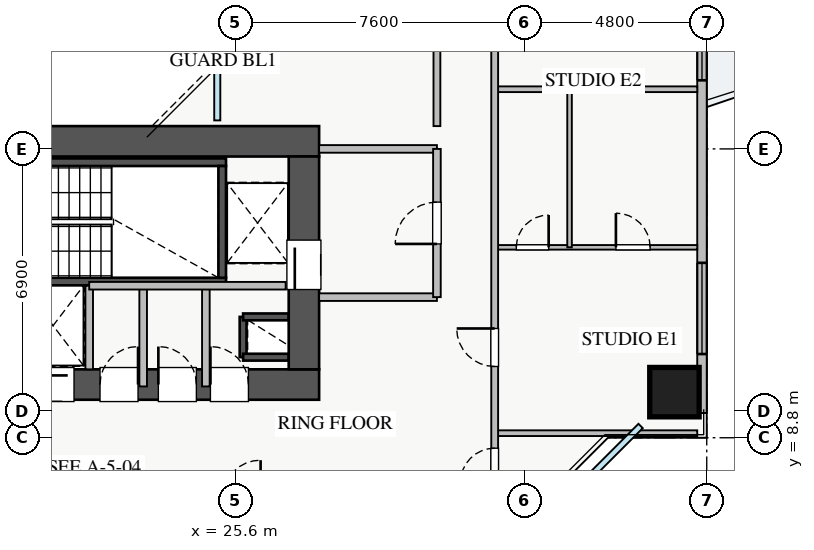
"""IFC4 building model, lengths in metres.
Left out: names, types, materials, properties, quantities, classifications, styles, units other than length and angle.
Written with IfcOpenShell. Run it as: python <this file> out.ifc"""

import sys

from ifc_helpers import new_model, si_unit, direction, frame, frame_2d, origin, origin_2d, place, context, subcontext, project, spatial, rectangle, extrude, source, transform, mapped, element, fill, save


model = new_model("IFC4")
c1 = context("Model", 3, precision=1e-05, world=origin(), true_north=direction((0.0, 1.0)))
c2 = subcontext(c1, "Body", "Model", "MODEL_VIEW")
j1 = project(units=[si_unit("LENGTHUNIT", "METRE"), si_unit("PLANEANGLEUNIT", "RADIAN")], contexts=[c1])
p1 = place(None, origin())
s1 = spatial("IfcSite", under=j1, at=p1, CompositionType="ELEMENT")
p2 = place(p1, origin())
s2 = spatial("IfcBuilding", under=s1, at=p2, CompositionType="ELEMENT")
p3 = place(p2, frame((0.0, 0.0, 32.75)))
s3 = spatial("IfcBuildingStorey", under=s2, at=p3, CompositionType="ELEMENT", Elevation=32.75)
p4 = place(p3, frame((25.8, 10.92, 0.0), z_axis=(0.0, 0.0, 1.0), x_axis=(0.0, 1.0, 0.0)))
e1 = element("IfcWall", 1, at=p4, inside=s3, PredefinedType="SHEAR", context=c2, shape_type="SweptSolid", body=[
    extrude(rectangle(XDim=1.06, YDim=0.18, at=frame_2d((0.53, 0.0))), origin(), (0.0, 0.0, 1.0), 3.07),
])
for number, where, z_axis, x_axis in (
    (2, (25.8, 11.98, 0.0), (0.0, 0.0, 1.0), (1.0, 0.0, 0.0)),
    (3, (25.8, 10.92, 0.0), (0.0, 0.0, 1.0), (1.0, 0.0, 0.0)),
):
    element("IfcWall", number, at=place(p3, frame(where, z_axis=z_axis, x_axis=x_axis)), inside=s3, PredefinedType="SHEAR", context=c2, shape_type="SweptSolid", body=[
        extrude(rectangle(XDim=1.2, YDim=0.18, at=frame_2d((0.6, 0.0))), origin(), (0.0, 0.0, 1.0), 3.07),
    ])
p5 = place(p3, frame((19.88, 12.8, 0.0), z_axis=(0.0, 0.0, 1.0), x_axis=(1.0, 0.0, 0.0)))
e4 = element("IfcWall", 4, at=p5, inside=s3, PredefinedType="SHEAR", context=c2, shape_type="SweptSolid", body=[
    extrude(rectangle(XDim=1.87, YDim=0.18, at=frame_2d((0.935, 0.0))), origin(), (0.0, 0.0, 1.0), 3.07),
])
p6 = place(p3, frame((18.2, 12.91, 0.0), z_axis=(0.0, 0.0, 1.0), x_axis=(1.0, 0.0, 0.0)))
e5 = element("IfcWall", 5, at=p6, inside=s3, PredefinedType="SHEAR", context=c2, shape_type="SweptSolid", body=[
    extrude(rectangle(XDim=7.15, YDim=0.2, at=frame_2d((3.575, 0.0))), origin(), (0.0, 0.0, 1.0), 3.25),
])
p7 = place(p6, frame((0.35, 0.0, 0.0)))
e6 = element("IfcOpeningElement", 6, at=p7, cuts=e5, PredefinedType="OPENING", context=c2, shape_type="SweptSolid", body=[
    extrude(rectangle(XDim=1.1, YDim=2.05, at=frame_2d((0.55, 1.025))), frame((0.0, 0.11, 0.0), z_axis=(0.0, -1.0, 0.0), x_axis=(1.0, 0.0, 0.0)), (0.0, 0.0, 1.0), 0.22),
])
p8 = place(p3, frame((18.2, 16.05, 0.0), z_axis=(0.0, 0.0, 1.0), x_axis=(1.0, 0.0, 0.0)))
e7 = element("IfcWall", 7, at=p8, inside=s3, PredefinedType="SHEAR", context=c2, shape_type="SweptSolid", body=[
    extrude(rectangle(XDim=7.15, YDim=0.2, at=frame_2d((3.575, 0.0))), origin(), (0.0, 0.0, 1.0), 3.25),
])
p9 = place(p3, frame((25.25, 13.01, 0.0), z_axis=(0.0, 0.0, 1.0), x_axis=(0.0, 1.0, 0.0)))
e8 = element("IfcWall", 8, at=p9, inside=s3, PredefinedType="SHEAR", context=c2, shape_type="SweptSolid", body=[
    extrude(rectangle(XDim=2.94, YDim=0.2, at=frame_2d((1.47, 0.0))), origin(), (0.0, 0.0, 1.0), 3.25),
])
p10 = place(p3, frame((10.2, 10.2, 0.0), z_axis=(0.0, 0.0, 1.0), x_axis=(1.0, 0.0, 0.0)))
e9 = element("IfcWall", 9, at=p10, inside=s3, PredefinedType="SHEAR", context=c2, shape_type="SweptSolid", body=[
    extrude(rectangle(XDim=17.6, YDim=0.8, at=frame_2d((8.8, 0.0))), origin(), (0.0, 0.0, 1.0), 3.25),
])
p11 = place(p10, frame((1.15, 0.0, 0.0)))
e10 = element("IfcOpeningElement", 10, at=p11, cuts=e9, PredefinedType="OPENING", context=c2, shape_type="SweptSolid", body=[
    extrude(rectangle(XDim=1.1, YDim=2.05, at=frame_2d((0.55, 1.025))), frame((0.0, 0.41, 0.0), z_axis=(0.0, -1.0, 0.0), x_axis=(1.0, 0.0, 0.0)), (0.0, 0.0, 1.0), 0.82),
])
p12 = place(p10, frame((8.3, 0.0, 0.0)))
e11 = element("IfcOpeningElement", 11, at=p12, cuts=e9, PredefinedType="OPENING", context=c2, shape_type="SweptSolid", body=[
    extrude(rectangle(XDim=1.1, YDim=2.05, at=frame_2d((0.55, 1.025))), frame((0.0, 0.41, 0.0), z_axis=(0.0, -1.0, 0.0), x_axis=(1.0, 0.0, 0.0)), (0.0, 0.0, 1.0), 0.82),
])
p13 = place(p10, frame((10.05, 0.0, 0.0)))
e12 = element("IfcOpeningElement", 12, at=p13, cuts=e9, PredefinedType="OPENING", context=c2, shape_type="SweptSolid", body=[
    extrude(rectangle(XDim=1.1, YDim=2.05, at=frame_2d((0.55, 1.025))), frame((0.0, 0.41, 0.0), z_axis=(0.0, -1.0, 0.0), x_axis=(1.0, 0.0, 0.0)), (0.0, 0.0, 1.0), 0.82),
])
p14 = place(p10, frame((14.74, 0.0, 0.0)))
e13 = element("IfcOpeningElement", 13, at=p14, cuts=e9, PredefinedType="OPENING", context=c2, shape_type="SweptSolid", body=[
    extrude(rectangle(XDim=1.0, YDim=2.05, at=frame_2d((0.5, 1.025))), frame((0.0, 0.41, 0.0), z_axis=(0.0, -1.0, 0.0), x_axis=(1.0, 0.0, 0.0)), (0.0, 0.0, 1.0), 0.82),
])
p15 = place(p10, frame((11.835, 0.0, 0.0)))
e14 = element("IfcOpeningElement", 14, at=p15, cuts=e9, PredefinedType="OPENING", context=c2, shape_type="SweptSolid", body=[
    extrude(rectangle(XDim=1.0, YDim=2.05, at=frame_2d((0.5, 1.025))), frame((0.0, 0.41, 0.0), z_axis=(0.0, -1.0, 0.0), x_axis=(1.0, 0.0, 0.0)), (0.0, 0.0, 1.0), 0.82),
])
p16 = place(p10, frame((13.37, 0.0, 0.0)))
e15 = element("IfcOpeningElement", 15, at=p16, cuts=e9, PredefinedType="OPENING", context=c2, shape_type="SweptSolid", body=[
    extrude(rectangle(XDim=1.0, YDim=2.05, at=frame_2d((0.5, 1.025))), frame((0.0, 0.41, 0.0), z_axis=(0.0, -1.0, 0.0), x_axis=(1.0, 0.0, 0.0)), (0.0, 0.0, 1.0), 0.82),
])
p17 = place(p3, frame((10.2, 16.6, 0.0), z_axis=(0.0, 0.0, 1.0), x_axis=(1.0, 0.0, 0.0)))
e16 = element("IfcWall", 16, at=p17, inside=s3, PredefinedType="SHEAR", context=c2, shape_type="SweptSolid", body=[
    extrude(rectangle(XDim=17.6, YDim=0.8, at=frame_2d((8.8, 0.0))), origin(), (0.0, 0.0, 1.0), 3.25),
])
p18 = place(p3, frame((27.4, 10.6, 0.0), z_axis=(0.0, 0.0, 1.0), x_axis=(0.0, 1.0, 0.0)))
e17 = element("IfcWall", 17, at=p18, inside=s3, PredefinedType="SHEAR", context=c2, shape_type="SweptSolid", body=[
    extrude(rectangle(XDim=5.6, YDim=0.8, at=frame_2d((2.8, 0.0))), origin(), (0.0, 0.0, 1.0), 3.25),
])
p19 = place(p18, frame((2.1, 0.0, 0.0)))
e18 = element("IfcOpeningElement", 18, at=p19, cuts=e17, PredefinedType="OPENING", context=c2, shape_type="SweptSolid", body=[
    extrude(rectangle(XDim=1.3, YDim=2.05, at=frame_2d((0.65, 1.025))), frame((0.0, 0.41, 0.0), z_axis=(0.0, -1.0, 0.0), x_axis=(1.0, 0.0, 0.0)), (0.0, 0.0, 1.0), 0.82),
])
m1 = source(origin(), c2, "Body", "SweptSolid", [
    extrude(rectangle(XDim=1.3, YDim=1.3, at=origin_2d()), origin(), (0.0, 0.0, 1.0), 3.25),
])
p20 = place(p3, frame((37.15, 10.0, 0.0), z_axis=(0.0, 0.0, 1.0), x_axis=(1.0, 0.0, 0.0)))
e19 = element("IfcColumn", 19, at=p20, inside=s3, PredefinedType="COLUMN", context=c2, shape_type="MappedRepresentation", body=[
    mapped(m1, transform((0.0, 0.0, 0.0), x_axis=(1.0, 0.0, 0.0), y_axis=(0.0, 1.0, 0.0), z_axis=(0.0, 0.0, 1.0), scale=1.0)),
])
p21 = place(p3, frame((37.875, 9.45, 0.0), z_axis=(0.0, 0.0, 1.0), x_axis=(0.0, 1.0, 0.0)))
e20 = element("IfcWall", 20, at=p21, inside=s3, PredefinedType="STANDARD", context=c2, shape_type="SweptSolid", body=[
    extrude(rectangle(XDim=27.1, YDim=0.25, at=frame_2d((13.55, 0.0))), origin(), (0.0, 0.0, 1.0), 2.61),
])
p22 = place(p21, frame((14.4, 0.0, 0.0)))
e21 = element("IfcOpeningElement", 21, at=p22, cuts=e20, PredefinedType="OPENING", context=c2, shape_type="SweptSolid", body=[
    extrude(rectangle(XDim=1.2, YDim=2.1, at=frame_2d((0.6, 1.05))), frame((0.0, 0.135, 0.0), z_axis=(0.0, -1.0, 0.0), x_axis=(1.0, 0.0, 0.0)), (0.0, 0.0, 1.0), 0.27),
])
p23 = place(p21, frame((1.552, 0.0, 0.9)))
e22 = element("IfcOpeningElement", 22, at=p23, cuts=e20, PredefinedType="OPENING", context=c2, shape_type="SweptSolid", body=[
    extrude(rectangle(XDim=2.4, YDim=1.5, at=frame_2d((1.2, 0.75))), frame((0.0, 0.135, 0.0), z_axis=(0.0, -1.0, 0.0), x_axis=(1.0, 0.0, 0.0)), (0.0, 0.0, 1.0), 0.27),
])
p24 = place(p21, frame((23.788, 0.0, 0.9)))
e23 = element("IfcOpeningElement", 23, at=p24, cuts=e20, PredefinedType="OPENING", context=c2, shape_type="SweptSolid", body=[
    extrude(rectangle(XDim=1.8, YDim=1.5, at=frame_2d((0.9, 0.75))), frame((0.0, 0.135, 0.0), z_axis=(0.0, -1.0, 0.0), x_axis=(1.0, 0.0, 0.0)), (0.0, 0.0, 1.0), 0.27),
])
p25 = place(p21, frame((19.758, 0.0, 0.9)))
e24 = element("IfcOpeningElement", 24, at=p25, cuts=e20, PredefinedType="OPENING", context=c2, shape_type="SweptSolid", body=[
    extrude(rectangle(XDim=2.4, YDim=1.5, at=frame_2d((1.2, 0.75))), frame((0.0, 0.135, 0.0), z_axis=(0.0, -1.0, 0.0), x_axis=(1.0, 0.0, 0.0)), (0.0, 0.0, 1.0), 0.27),
])
p26 = place(p21, frame((8.755, 0.0, 0.9)))
e25 = element("IfcOpeningElement", 25, at=p26, cuts=e20, PredefinedType="OPENING", context=c2, shape_type="SweptSolid", body=[
    extrude(rectangle(XDim=0.9, YDim=1.2, at=frame_2d((0.45, 0.6))), frame((0.0, 0.135, 0.0), z_axis=(0.0, -1.0, 0.0), x_axis=(1.0, 0.0, 0.0)), (0.0, 0.0, 1.0), 0.27),
])
for number, where, z_axis, x_axis in (
    (26, (27.8, 16.4, 0.0), (0.0, 0.0, 1.0), (1.0, 0.0, 0.0)),
    (27, (27.8, 12.5, 0.0), (0.0, 0.0, 1.0), (1.0, 0.0, 0.0)),
):
    element("IfcWall", number, at=place(p3, frame(where, z_axis=z_axis, x_axis=x_axis)), inside=s3, PredefinedType="PARTITIONING", context=c2, shape_type="SweptSolid", body=[
        extrude(rectangle(XDim=3.1, YDim=0.2, at=frame_2d((1.55, 0.0))), origin(), (0.0, 0.0, 1.0), 3.07),
    ])
p27 = place(p3, frame((30.9, 12.5, 0.0), z_axis=(0.0, 0.0, 1.0), x_axis=(0.0, 1.0, 0.0)))
e28 = element("IfcWall", 28, at=p27, inside=s3, PredefinedType="PARTITIONING", context=c2, shape_type="SweptSolid", body=[
    extrude(rectangle(XDim=3.9, YDim=0.2, at=frame_2d((1.95, 0.0))), origin(), (0.0, 0.0, 1.0), 3.07),
])
p28 = place(p27, frame((1.4, 0.0, 0.0)))
e29 = element("IfcOpeningElement", 29, at=p28, cuts=e28, PredefinedType="OPENING", context=c2, shape_type="SweptSolid", body=[
    extrude(rectangle(XDim=1.1, YDim=2.05, at=frame_2d((0.55, 1.025))), frame((0.0, 0.11, 0.0), z_axis=(0.0, -1.0, 0.0), x_axis=(1.0, 0.0, 0.0)), (0.0, 0.0, 1.0), 0.22),
])
p29 = place(p3, frame((24.82, 10.15, 0.0), z_axis=(0.0, 0.0, 1.0), x_axis=(0.0, 1.0, 0.0)))
e30 = element("IfcWall", 30, at=p29, inside=s3, PredefinedType="PARTITIONING", context=c2, shape_type="SweptSolid", body=[
    extrude(rectangle(XDim=2.65, YDim=0.2, at=frame_2d((1.325, 0.0))), origin(), (0.0, 0.0, 1.0), 3.07),
])
p30 = place(p3, frame((21.75, 10.6, 0.0), z_axis=(0.0, 0.0, 1.0), x_axis=(0.0, 1.0, 0.0)))
e31 = element("IfcWall", 31, at=p30, inside=s3, PredefinedType="PARTITIONING", context=c2, shape_type="SweptSolid", body=[
    extrude(rectangle(XDim=2.2, YDim=0.2, at=frame_2d((1.1, 0.0))), origin(), (0.0, 0.0, 1.0), 3.07),
])
p31 = place(p3, frame((23.17, 10.15, 0.0), z_axis=(0.0, 0.0, 1.0), x_axis=(0.0, 1.0, 0.0)))
e32 = element("IfcWall", 32, at=p31, inside=s3, PredefinedType="PARTITIONING", context=c2, shape_type="SweptSolid", body=[
    extrude(rectangle(XDim=2.65, YDim=0.2, at=frame_2d((1.325, 0.0))), origin(), (0.0, 0.0, 1.0), 3.07),
])
p32 = place(p3, frame((21.75, 12.8, 0.0), z_axis=(0.0, 0.0, 1.0), x_axis=(1.0, 0.0, 0.0)))
e33 = element("IfcWall", 33, at=p32, inside=s3, PredefinedType="PARTITIONING", context=c2, shape_type="SweptSolid", body=[
    extrude(rectangle(XDim=5.17, YDim=0.2, at=frame_2d((2.585, 0.0))), origin(), (0.0, 0.0, 1.0), 3.07),
])
p33 = place(p3, frame((32.42, 8.92, 0.0), z_axis=(0.0, 0.0, 1.0), x_axis=(1.0, 0.0, 0.0)))
e34 = element("IfcWall", 34, at=p33, inside=s3, PredefinedType="PARTITIONING", context=c2, shape_type="SweptSolid", body=[
    extrude(rectangle(XDim=5.33, YDim=0.15, at=frame_2d((2.665, 0.0))), origin(), (0.0, 0.0, 1.0), 3.07),
])
p34 = place(p3, frame((32.42, 13.81, 0.0), z_axis=(0.0, 0.0, 1.0), x_axis=(1.0, 0.0, 0.0)))
e35 = element("IfcWall", 35, at=p34, inside=s3, PredefinedType="PLUMBINGWALL", context=c2, shape_type="SweptSolid", body=[
    extrude(rectangle(XDim=5.33, YDim=0.12, at=frame_2d((2.665, 0.0))), origin(), (0.0, 0.0, 1.0), 3.07),
])
p35 = place(p34, frame((0.57, 0.0, 0.0)))
e36 = element("IfcOpeningElement", 36, at=p35, cuts=e35, PredefinedType="OPENING", context=c2, shape_type="SweptSolid", body=[
    extrude(rectangle(XDim=0.85, YDim=2.05, at=frame_2d((0.425, 1.025))), frame((0.0, 0.07, 0.0), z_axis=(0.0, -1.0, 0.0), x_axis=(1.0, 0.0, 0.0)), (0.0, 0.0, 1.0), 0.14),
])
p36 = place(p34, frame((3.19, 0.0, 0.0)))
e37 = element("IfcOpeningElement", 37, at=p36, cuts=e35, PredefinedType="OPENING", context=c2, shape_type="SweptSolid", body=[
    extrude(rectangle(XDim=0.9, YDim=2.05, at=frame_2d((0.45, 1.025))), frame((0.0, 0.07, 0.0), z_axis=(0.0, -1.0, 0.0), x_axis=(1.0, 0.0, 0.0)), (0.0, 0.0, 1.0), 0.14),
])
p37 = place(p3, frame((34.39, 13.81, 0.0), z_axis=(0.0, 0.0, 1.0), x_axis=(0.0, 1.0, 0.0)))
e38 = element("IfcWall", 38, at=p37, inside=s3, PredefinedType="PLUMBINGWALL", context=c2, shape_type="SweptSolid", body=[
    extrude(rectangle(XDim=4.16, YDim=0.12, at=frame_2d((2.08, 0.0))), origin(), (0.0, 0.0, 1.0), 3.07),
])
p38 = place(p3, frame((32.42, 17.97, 0.0), z_axis=(0.0, 0.0, 1.0), x_axis=(1.0, 0.0, 0.0)))
e39 = element("IfcWall", 39, at=p38, inside=s3, PredefinedType="PARTITIONING", context=c2, shape_type="SweptSolid", body=[
    extrude(rectangle(XDim=5.33, YDim=0.15, at=frame_2d((2.665, 0.0))), origin(), (0.0, 0.0, 1.0), 3.07),
])
p39 = place(p3, frame((32.42, 7.21, 0.0), z_axis=(0.0, 0.0, 1.0), x_axis=(0.0, 1.0, 0.0)))
e40 = element("IfcWall", 40, at=p39, inside=s3, PredefinedType="PARTITIONING", context=c2, shape_type="SweptSolid", body=[
    extrude(rectangle(XDim=31.23, YDim=0.18, at=frame_2d((15.615, 0.0))), origin(), (0.0, 0.0, 1.0), 2.771),
])
p40 = place(p39, frame((30.09, 0.0, 0.0)))
e41 = element("IfcOpeningElement", 41, at=p40, cuts=e40, PredefinedType="OPENING", context=c2, shape_type="SweptSolid", body=[
    extrude(rectangle(XDim=0.9, YDim=2.05, at=frame_2d((0.45, 1.025))), frame((0.0, 0.1, 0.0), z_axis=(0.0, -1.0, 0.0), x_axis=(1.0, 0.0, 0.0)), (0.0, 0.0, 1.0), 0.2),
])
p41 = place(p39, frame((0.415, 0.0, 0.0)))
e42 = element("IfcOpeningElement", 42, at=p41, cuts=e40, PredefinedType="OPENING", context=c2, shape_type="SweptSolid", body=[
    extrude(rectangle(XDim=0.9, YDim=2.05, at=frame_2d((0.45, 1.025))), frame((0.0, 0.1, 0.0), z_axis=(0.0, -1.0, 0.0), x_axis=(1.0, 0.0, 0.0)), (0.0, 0.0, 1.0), 0.2),
])
p42 = place(p39, frame((3.465, 0.0, 0.0)))
e43 = element("IfcOpeningElement", 43, at=p42, cuts=e40, PredefinedType="OPENING", context=c2, shape_type="SweptSolid", body=[
    extrude(rectangle(XDim=1.0, YDim=2.05, at=frame_2d((0.5, 1.025))), frame((0.0, 0.1, 0.0), z_axis=(0.0, -1.0, 0.0), x_axis=(1.0, 0.0, 0.0)), (0.0, 0.0, 1.0), 0.2),
])
p43 = place(p39, frame((12.635, 0.0, 0.0)))
e44 = element("IfcOpeningElement", 44, at=p43, cuts=e40, PredefinedType="OPENING", context=c2, shape_type="SweptSolid", body=[
    extrude(rectangle(XDim=1.0, YDim=2.05, at=frame_2d((0.5, 1.025))), frame((0.0, 0.1, 0.0), z_axis=(0.0, -1.0, 0.0), x_axis=(1.0, 0.0, 0.0)), (0.0, 0.0, 1.0), 0.2),
])
p44 = place(p39, frame((22.5, 0.0, 0.0)))
e45 = element("IfcOpeningElement", 45, at=p44, cuts=e40, PredefinedType="OPENING", context=c2, shape_type="SweptSolid", body=[
    extrude(rectangle(XDim=1.0, YDim=2.05, at=frame_2d((0.5, 1.025))), frame((0.0, 0.1, 0.0), z_axis=(0.0, -1.0, 0.0), x_axis=(1.0, 0.0, 0.0)), (0.0, 0.0, 1.0), 0.2),
])
p45 = place(p3, frame((30.9, 17.0, 0.0), z_axis=(0.0, 0.0, 1.0), x_axis=(0.0, 1.0, 0.0)))
e46 = element("IfcWall", 46, at=p45, inside=s3, PredefinedType="PARTITIONING", context=c2, shape_type="SweptSolid", body=[
    extrude(rectangle(XDim=12.0, YDim=0.18, at=frame_2d((6.0, 0.0))), origin(), (0.0, 0.0, 1.0), 3.07),
])
p46 = place(p45, frame((2.36, 0.0, 0.0)))
e47 = element("IfcOpeningElement", 47, at=p46, cuts=e46, PredefinedType="OPENING", context=c2, shape_type="SweptSolid", body=[
    extrude(rectangle(XDim=1.0, YDim=2.05, at=frame_2d((0.5, 1.025))), frame((0.0, 0.1, 0.0), z_axis=(0.0, -1.0, 0.0), x_axis=(1.0, 0.0, 0.0)), (0.0, 0.0, 1.0), 0.2),
])
m2 = source(origin(), c2, "Body", "SweptSolid", [
    extrude(rectangle(XDim=2.4, YDim=1.5, at=frame_2d((1.2, 0.75))), frame((0.0, 0.03, 0.0), z_axis=(0.0, -1.0, 0.0), x_axis=(1.0, 0.0, 0.0)), (0.0, 0.0, 1.0), 0.06),
])
p47 = place(p23, origin())
e48 = element("IfcWindow", 48, at=p47, inside=s3, PartitioningType="TRIPLE_PANEL_VERTICAL", PredefinedType="WINDOW", context=c2, shape_type="MappedRepresentation", body=[
    mapped(m2, transform((0.0, 0.0, 0.0), x_axis=(1.0, 0.0, 0.0), y_axis=(0.0, 1.0, 0.0), z_axis=(0.0, 0.0, 1.0), scale=1.0)),
])
fill(e22, e48)
m3 = source(origin(), c2, "Body", "SweptSolid", [
    extrude(rectangle(XDim=1.3, YDim=2.05, at=frame_2d((0.65, 1.025))), frame((0.0, 0.025, 0.0), z_axis=(0.0, -1.0, 0.0), x_axis=(1.0, 0.0, 0.0)), (0.0, 0.0, 1.0), 0.05),
])
p48 = place(p19, origin())
e49 = element("IfcDoor", 49, at=p48, inside=s3, OperationType="SLIDING_TO_RIGHT", PredefinedType="DOOR", context=c2, shape_type="MappedRepresentation", body=[
    mapped(m3, transform((0.0, 0.0, 0.0), x_axis=(1.0, 0.0, 0.0), y_axis=(0.0, 1.0, 0.0), z_axis=(0.0, 0.0, 1.0), scale=1.0)),
])
fill(e18, e49)
m4 = source(origin(), c2, "Body", "SweptSolid", [
    extrude(rectangle(XDim=1.1, YDim=2.05, at=frame_2d((0.55, 1.025))), frame((0.0, 0.025, 0.0), z_axis=(0.0, -1.0, 0.0), x_axis=(1.0, 0.0, 0.0)), (0.0, 0.0, 1.0), 0.05),
])
p49 = place(p13, origin())
e50 = element("IfcDoor", 50, at=p49, inside=s3, OperationType="SLIDING_TO_RIGHT", PredefinedType="DOOR", context=c2, shape_type="MappedRepresentation", body=[
    mapped(m4, transform((0.0, 0.0, 0.0), x_axis=(1.0, 0.0, 0.0), y_axis=(0.0, 1.0, 0.0), z_axis=(0.0, 0.0, 1.0), scale=1.0)),
])
fill(e12, e50)
m5 = source(origin(), c2, "Body", "SweptSolid", [
    extrude(rectangle(XDim=1.0, YDim=2.05, at=frame_2d((0.5, 1.025))), frame((0.0, 0.025, 0.0), z_axis=(0.0, -1.0, 0.0), x_axis=(1.0, 0.0, 0.0)), (0.0, 0.0, 1.0), 0.05),
])
p50 = place(p14, origin())
e51 = element("IfcDoor", 51, at=p50, inside=s3, OperationType="SINGLE_SWING_LEFT", PredefinedType="DOOR", context=c2, shape_type="MappedRepresentation", body=[
    mapped(m5, transform((0.0, 0.0, 0.0), x_axis=(1.0, 0.0, 0.0), y_axis=(0.0, 1.0, 0.0), z_axis=(0.0, 0.0, 1.0), scale=1.0)),
])
fill(e13, e51)
p51 = place(p15, origin())
e52 = element("IfcDoor", 52, at=p51, inside=s3, OperationType="SINGLE_SWING_RIGHT", PredefinedType="DOOR", context=c2, shape_type="MappedRepresentation", body=[
    mapped(m5, transform((0.0, 0.0, 0.0), x_axis=(1.0, 0.0, 0.0), y_axis=(0.0, 1.0, 0.0), z_axis=(0.0, 0.0, 1.0), scale=1.0)),
])
fill(e14, e52)
p52 = place(p16, origin())
e53 = element("IfcDoor", 53, at=p52, inside=s3, OperationType="SINGLE_SWING_LEFT", PredefinedType="DOOR", context=c2, shape_type="MappedRepresentation", body=[
    mapped(m5, transform((0.0, 0.0, 0.0), x_axis=(1.0, 0.0, 0.0), y_axis=(0.0, 1.0, 0.0), z_axis=(0.0, 0.0, 1.0), scale=1.0)),
])
fill(e15, e53)
p53 = place(p28, origin())
e54 = element("IfcDoor", 54, at=p53, inside=s3, OperationType="SINGLE_SWING_LEFT", PredefinedType="DOOR", context=c2, shape_type="MappedRepresentation", body=[
    mapped(m4, transform((0.0, 0.0, 0.0), x_axis=(1.0, 0.0, 0.0), y_axis=(0.0, 1.0, 0.0), z_axis=(0.0, 0.0, 1.0), scale=1.0)),
])
fill(e29, e54)
m6 = source(origin(), c2, "Body", "SweptSolid", [
    extrude(rectangle(XDim=0.85, YDim=2.05, at=frame_2d((0.425, 1.025))), frame((0.0, 0.025, 0.0), z_axis=(0.0, -1.0, 0.0), x_axis=(1.0, 0.0, 0.0)), (0.0, 0.0, 1.0), 0.05),
])
p54 = place(p35, origin())
e55 = element("IfcDoor", 55, at=p54, inside=s3, OperationType="SINGLE_SWING_RIGHT", PredefinedType="DOOR", context=c2, shape_type="MappedRepresentation", body=[
    mapped(m6, transform((0.0, 0.0, 0.0), x_axis=(1.0, 0.0, 0.0), y_axis=(0.0, 1.0, 0.0), z_axis=(0.0, 0.0, 1.0), scale=1.0)),
])
fill(e36, e55)
m7 = source(origin(), c2, "Body", "SweptSolid", [
    extrude(rectangle(XDim=0.9, YDim=2.05, at=frame_2d((0.45, 1.025))), frame((0.0, 0.025, 0.0), z_axis=(0.0, -1.0, 0.0), x_axis=(1.0, 0.0, 0.0)), (0.0, 0.0, 1.0), 0.05),
])
p55 = place(p36, origin())
e56 = element("IfcDoor", 56, at=p55, inside=s3, OperationType="SINGLE_SWING_LEFT", PredefinedType="DOOR", context=c2, shape_type="MappedRepresentation", body=[
    mapped(m7, transform((0.0, 0.0, 0.0), x_axis=(1.0, 0.0, 0.0), y_axis=(0.0, 1.0, 0.0), z_axis=(0.0, 0.0, 1.0), scale=1.0)),
])
fill(e37, e56)
p56 = place(p41, origin())
e57 = element("IfcDoor", 57, at=p56, inside=s3, OperationType="SINGLE_SWING_LEFT", PredefinedType="DOOR", context=c2, shape_type="MappedRepresentation", body=[
    mapped(m7, transform((0.0, 0.0, 0.0), x_axis=(1.0, 0.0, 0.0), y_axis=(0.0, 1.0, 0.0), z_axis=(0.0, 0.0, 1.0), scale=1.0)),
])
fill(e42, e57)
p57 = place(p42, origin())
e58 = element("IfcDoor", 58, at=p57, inside=s3, OperationType="SINGLE_SWING_RIGHT", PredefinedType="DOOR", context=c2, shape_type="MappedRepresentation", body=[
    mapped(m5, transform((0.0, 0.0, 0.0), x_axis=(1.0, 0.0, 0.0), y_axis=(0.0, 1.0, 0.0), z_axis=(0.0, 0.0, 1.0), scale=1.0)),
])
fill(e43, e58)
m8 = source(origin(), c2, "Body", "SweptSolid", [
    extrude(rectangle(XDim=0.9, YDim=1.2, at=frame_2d((0.45, 0.6))), frame((0.0, 0.03, 0.0), z_axis=(0.0, -1.0, 0.0), x_axis=(1.0, 0.0, 0.0)), (0.0, 0.0, 1.0), 0.06),
])
p58 = place(p26, origin())
e59 = element("IfcWindow", 59, at=p58, inside=s3, PartitioningType="SINGLE_PANEL", PredefinedType="WINDOW", context=c2, shape_type="MappedRepresentation", body=[
    mapped(m8, transform((0.0, 0.0, 0.0), x_axis=(1.0, 0.0, 0.0), y_axis=(0.0, 1.0, 0.0), z_axis=(0.0, 0.0, 1.0), scale=1.0)),
])
fill(e25, e59)
save(model, sys.argv[1])
